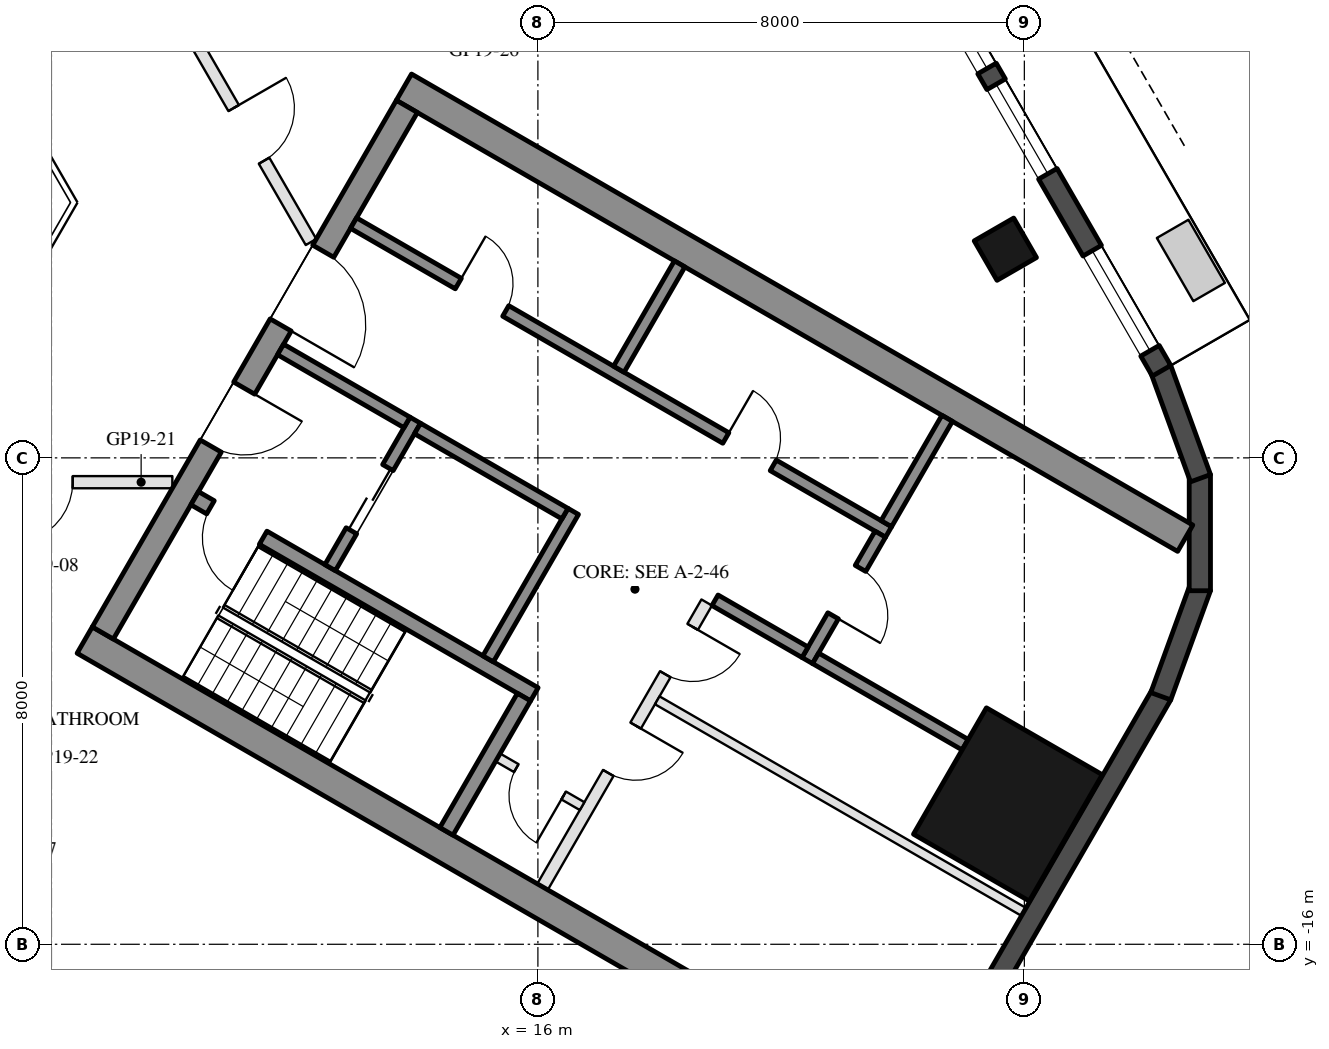
"""IFC4 building model, lengths in metres.
Left out: names, types, materials, properties, quantities, classifications, styles, units other than length and angle.
Written with IfcOpenShell. Run it as: python <this file> out.ifc"""

import sys

from ifc_helpers import new_model, si_unit, direction, frame, frame_2d, origin, origin_2d, place, context, subcontext, project, spatial, rectangle, hollow_rectangle, extrude, element, fill, save


model = new_model("IFC4")
c1 = context("Model", 3, precision=1e-05, world=origin(), true_north=direction((0.0, 1.0)))
c2 = subcontext(c1, "Body", "Model", "MODEL_VIEW")
j1 = project(units=[si_unit("LENGTHUNIT", "METRE"), si_unit("PLANEANGLEUNIT", "RADIAN")], contexts=[c1])
p1 = place(None, origin())
s1 = spatial("IfcSite", under=j1, at=p1, CompositionType="ELEMENT")
p2 = place(p1, origin())
s2 = spatial("IfcBuilding", under=s1, at=p2, CompositionType="ELEMENT")
p3 = place(p2, frame((0.0, 0.0, 202.1)))
s3 = spatial("IfcBuildingStorey", under=s2, at=p3, CompositionType="ELEMENT", Elevation=202.1)
p4 = place(p3, frame((23.688, -4.568, 0.0), z_axis=(0.0, 0.0, 1.0), x_axis=(-0.5, 0.866025403784, 0.0)))
e1 = element("IfcColumn", 1, at=p4, inside=s3, PredefinedType="COLUMN", context=c2, shape_type="SweptSolid", body=[
    extrude(hollow_rectangle(XDim=0.75, YDim=0.75, WallThickness=0.035, at=origin_2d()), origin(), (0.0, 0.0, 1.0), 3.7),
])
p5 = place(p3, frame((23.729, -13.7, 0.0), z_axis=(0.0, 0.0, 1.0), x_axis=(0.5, 0.866025403784, 0.0)))
e2 = element("IfcColumn", 2, at=p5, inside=s3, PredefinedType="COLUMN", context=c2, shape_type="SweptSolid", body=[
    extrude(hollow_rectangle(XDim=2.4, YDim=2.2, WallThickness=0.06, at=origin_2d()), origin(), (0.0, 0.0, 1.0), 3.7),
])
p6 = place(p3, frame((23.427, -16.792, 0.0), z_axis=(0.0, 0.0, 1.0), x_axis=(0.500018773155, 0.866014564827, 0.0)))
e3 = element("IfcWall", 3, at=p6, inside=s3, PredefinedType="SOLIDWALL", context=c2, shape_type="SweptSolid", body=[
    extrude(rectangle(XDim=5.658, YDim=0.35, at=frame_2d((2.829, 0.0))), origin(), (0.0, 0.0, 1.0), 3.55),
])
for number, where, z_axis, x_axis in (
    (4, (26.244, -11.92, 0.0), (0.0, 0.0, 1.0), (0.342, 0.94, 0.0)),
    (5, (26.886, -10.185, 0.0), (0.0, 0.0, 1.0), (0.0, 1.0, 0.0)),
    (6, (26.897, -8.335, 0.0), (0.0, 0.0, 1.0), (-0.342, 0.94, 0.0)),
):
    element("IfcWall", number, at=place(p3, frame(where, z_axis=z_axis, x_axis=x_axis)), inside=s3, PredefinedType="SOLIDWALL", context=c2, shape_type="SweptSolid", body=[
        extrude(rectangle(XDim=1.91, YDim=0.35, at=frame_2d((0.955, 0.0))), origin(), (0.0, 0.0, 1.0), 3.55),
    ])
p7 = place(p3, frame((26.257, -6.567, 0.0), z_axis=(0.0, 0.0, 1.0), x_axis=(-0.500023526245, 0.866011820475, 0.0)))
e7 = element("IfcWall", 7, at=p7, inside=s3, PredefinedType="SOLIDWALL", context=c2, shape_type="SweptSolid", body=[
    extrude(rectangle(XDim=11.816, YDim=0.35, at=frame_2d((5.908, 0.0))), origin(), (0.0, 0.0, 1.0), 3.55),
])
p8 = place(p7, frame((0.38, 0.0, 0.3)))
e8 = element("IfcOpeningElement", 8, at=p8, cuts=e7, PredefinedType="OPENING", context=c2, shape_type="SweptSolid", body=[
    extrude(rectangle(XDim=1.9, YDim=2.65, at=frame_2d((0.95, 1.325))), frame((0.0, 0.185, 0.0), z_axis=(0.0, -1.0, 0.0), x_axis=(1.0, 0.0, 0.0)), (0.0, 0.0, 1.0), 0.37),
])
p9 = place(p7, frame((7.791, 0.0, 0.0)))
e9 = element("IfcOpeningElement", 9, at=p9, cuts=e7, PredefinedType="OPENING", context=c2, shape_type="SweptSolid", body=[
    extrude(rectangle(XDim=2.4, YDim=2.4, at=frame_2d((1.2, 1.2))), frame((0.0, 0.185, 0.0), z_axis=(0.0, -1.0, 0.0), x_axis=(1.0, 0.0, 0.0)), (0.0, 0.0, 1.0), 0.37),
])
p10 = place(p7, frame((3.741, 0.0, 0.3)))
e10 = element("IfcOpeningElement", 10, at=p10, cuts=e7, PredefinedType="OPENING", context=c2, shape_type="SweptSolid", body=[
    extrude(rectangle(XDim=1.7, YDim=2.65, at=frame_2d((0.85, 1.325))), frame((0.0, 0.185, 0.0), z_axis=(0.0, -1.0, 0.0), x_axis=(1.0, 0.0, 0.0)), (0.0, 0.0, 1.0), 0.37),
])
p11 = place(p7, frame((5.741, 0.0, 0.3)))
e11 = element("IfcOpeningElement", 11, at=p11, cuts=e7, PredefinedType="OPENING", context=c2, shape_type="SweptSolid", body=[
    extrude(rectangle(XDim=1.7, YDim=2.65, at=frame_2d((0.85, 1.325))), frame((0.0, 0.185, 0.0), z_axis=(0.0, -1.0, 0.0), x_axis=(1.0, 0.0, 0.0)), (0.0, 0.0, 1.0), 0.37),
])
for number, where, z_axis, x_axis in (
    (12, (8.547, -10.997, 0.0), (0.0, 0.0, 1.0), (0.866, -0.5, 0.0)),
    (13, (13.797, -1.903, 0.0), (0.0, 0.0, 1.0), (0.866, -0.5, 0.0)),
):
    element("IfcWall", number, at=place(p3, frame(where, z_axis=z_axis, x_axis=x_axis)), inside=s3, PredefinedType="SHEAR", context=c2, shape_type="SweptSolid", body=[
        extrude(rectangle(XDim=14.837, YDim=0.5, at=frame_2d((7.418, 0.0))), origin(), (0.0, 0.0, 1.0), 3.5),
    ])
p12 = place(p3, frame((8.845, -10.88, 0.0), z_axis=(0.0, 0.0, 1.0), x_axis=(0.500004234368, 0.866022959057, 0.0)))
e14 = element("IfcWall", 14, at=p12, inside=s3, PredefinedType="SHEAR", context=c2, shape_type="SweptSolid", body=[
    extrude(rectangle(XDim=10.0, YDim=0.4, at=frame_2d((5.0, 0.0))), origin(), (0.0, 0.0, 1.0), 3.5),
])
p13 = place(p12, frame((3.55, 0.0, 0.0)))
e15 = element("IfcOpeningElement", 15, at=p13, cuts=e14, PredefinedType="OPENING", context=c2, shape_type="SweptSolid", body=[
    extrude(rectangle(XDim=1.1, YDim=2.1, at=frame_2d((0.55, 1.05))), frame((0.0, 0.21, 0.0), z_axis=(0.0, -1.0, 0.0), x_axis=(1.0, 0.0, 0.0)), (0.0, 0.0, 1.0), 0.42),
])
p14 = place(p12, frame((5.85, 0.0, 0.0)))
e16 = element("IfcOpeningElement", 16, at=p14, cuts=e14, PredefinedType="OPENING", context=c2, shape_type="SweptSolid", body=[
    extrude(rectangle(XDim=1.4, YDim=2.1, at=frame_2d((0.7, 1.05))), frame((0.0, 0.21, 0.0), z_axis=(0.0, -1.0, 0.0), x_axis=(1.0, 0.0, 0.0)), (0.0, 0.0, 1.0), 0.42),
])
p15 = place(p3, frame((10.356, -8.664, 0.0), z_axis=(0.0, 0.0, 1.0), x_axis=(0.866028629588, -0.499994412703, 0.0)))
e17 = element("IfcWall", 17, at=p15, inside=s3, PredefinedType="SHEAR", context=c2, shape_type="SweptSolid", body=[
    extrude(rectangle(XDim=6.45, YDim=0.25, at=frame_2d((3.225, 0.0))), origin(), (0.0, 0.0, 1.0), 3.5),
])
p16 = place(p15, frame((0.3, 0.0, 0.0)))
e18 = element("IfcOpeningElement", 18, at=p16, cuts=e17, PredefinedType="OPENING", context=c2, shape_type="SweptSolid", body=[
    extrude(rectangle(XDim=1.0, YDim=2.1, at=frame_2d((0.5, 1.05))), frame((0.0, 0.135, 0.0), z_axis=(0.0, -1.0, 0.0), x_axis=(1.0, 0.0, 0.0)), (0.0, 0.0, 1.0), 0.27),
])
p17 = place(p3, frame((14.496, -14.143, 0.0), z_axis=(0.0, 0.0, 1.0), x_axis=(0.500062241894, 0.865989465428, 0.0)))
e19 = element("IfcWall", 19, at=p17, inside=s3, PredefinedType="SHEAR", context=c2, shape_type="SweptSolid", body=[
    extrude(rectangle(XDim=2.55, YDim=0.25, at=frame_2d((1.275, 0.0))), origin(), (0.0, 0.0, 1.0), 3.5),
])
p18 = place(p3, frame((15.181, -11.305, 0.0), z_axis=(0.0, 0.0, 1.0), x_axis=(0.49994636267, 0.866056369097, 0.0)))
e20 = element("IfcWall", 20, at=p18, inside=s3, PredefinedType="SHEAR", context=c2, shape_type="SweptSolid", body=[
    extrude(rectangle(XDim=2.8, YDim=0.2, at=frame_2d((1.4, 0.0))), origin(), (0.0, 0.0, 1.0), 3.5),
])
p19 = place(p3, frame((12.583, -9.805, 0.0), z_axis=(0.0, 0.0, 1.0), x_axis=(0.49994636267, 0.866056369097, 0.0)))
e21 = element("IfcWall", 21, at=p19, inside=s3, PredefinedType="SHEAR", context=c2, shape_type="SweptSolid", body=[
    extrude(rectangle(XDim=2.8, YDim=0.2, at=frame_2d((1.4, 0.0))), origin(), (0.0, 0.0, 1.0), 3.5),
])
p20 = place(p19, frame((0.7, 0.0, 0.0)))
e22 = element("IfcOpeningElement", 22, at=p20, cuts=e21, PredefinedType="OPENING", context=c2, shape_type="SweptSolid", body=[
    extrude(rectangle(XDim=1.2, YDim=2.1, at=frame_2d((0.6, 1.05))), frame((0.0, 0.11, 0.0), z_axis=(0.0, -1.0, 0.0), x_axis=(1.0, 0.0, 0.0)), (0.0, 0.0, 1.0), 0.22),
])
p21 = place(p3, frame((11.768, -6.217, 0.0), z_axis=(0.0, 0.0, 1.0), x_axis=(0.866050077142, -0.499957262057, 0.0)))
e23 = element("IfcWall", 23, at=p21, inside=s3, PredefinedType="SHEAR", context=c2, shape_type="SweptSolid", body=[
    extrude(rectangle(XDim=2.4, YDim=0.2, at=frame_2d((1.2, 0.0))), origin(), (0.0, 0.0, 1.0), 3.5),
])
p22 = place(p3, frame((14.02, -7.517, 0.0), z_axis=(0.0, 0.0, 1.0), x_axis=(0.866034573852, -0.49998411664, 0.0)))
e24 = element("IfcWall", 24, at=p22, inside=s3, PredefinedType="SHEAR", context=c2, shape_type="SweptSolid", body=[
    extrude(rectangle(XDim=2.8, YDim=0.2, at=frame_2d((1.4, 0.0))), origin(), (0.0, 0.0, 1.0), 3.5),
])
p23 = place(p3, frame((12.968, -4.138, 0.0), z_axis=(0.0, 0.0, 1.0), x_axis=(0.866028328073, -0.49999493495, 0.0)))
e25 = element("IfcWall", 25, at=p23, inside=s3, PredefinedType="SHEAR", context=c2, shape_type="SweptSolid", body=[
    extrude(rectangle(XDim=10.16, YDim=0.2, at=frame_2d((5.08, 0.0))), origin(), (0.0, 0.0, 1.0), 3.5),
])
p24 = place(p23, frame((1.99, 0.0, 0.0)))
e26 = element("IfcOpeningElement", 26, at=p24, cuts=e25, PredefinedType="OPENING", context=c2, shape_type="SweptSolid", body=[
    extrude(rectangle(XDim=0.9, YDim=2.1, at=frame_2d((0.45, 1.05))), frame((0.0, 0.11, 0.0), z_axis=(0.0, -1.0, 0.0), x_axis=(1.0, 0.0, 0.0)), (0.0, 0.0, 1.0), 0.22),
])
p25 = place(p23, frame((7.07, 0.0, 0.0)))
e27 = element("IfcOpeningElement", 27, at=p25, cuts=e25, PredefinedType="OPENING", context=c2, shape_type="SweptSolid", body=[
    extrude(rectangle(XDim=0.9, YDim=2.1, at=frame_2d((0.45, 1.05))), frame((0.0, 0.11, 0.0), z_axis=(0.0, -1.0, 0.0), x_axis=(1.0, 0.0, 0.0)), (0.0, 0.0, 1.0), 0.22),
])
p26 = place(p3, frame((20.43, -11.333, 0.0), z_axis=(0.0, 0.0, 1.0), x_axis=(0.500001309137, 0.866024647952, 0.0)))
e28 = element("IfcWall", 28, at=p26, inside=s3, PredefinedType="SHEAR", context=c2, shape_type="SweptSolid", body=[
    extrude(rectangle(XDim=2.4, YDim=0.2, at=frame_2d((1.2, 0.0))), origin(), (0.0, 0.0, 1.0), 3.5),
])
p27 = place(p26, frame((0.85, 0.0, 0.0)))
e29 = element("IfcOpeningElement", 29, at=p27, cuts=e28, PredefinedType="OPENING", context=c2, shape_type="SweptSolid", body=[
    extrude(rectangle(XDim=0.9, YDim=2.1, at=frame_2d((0.45, 1.05))), frame((0.0, 0.11, 0.0), z_axis=(0.0, -1.0, 0.0), x_axis=(1.0, 0.0, 0.0)), (0.0, 0.0, 1.0), 0.22),
])
p28 = place(p3, frame((18.913, -10.342, 0.0), z_axis=(0.0, 0.0, 1.0), x_axis=(0.866038183914, -0.499977863513, 0.0)))
e30 = element("IfcWall", 30, at=p28, inside=s3, PredefinedType="SHEAR", context=c2, shape_type="SweptSolid", body=[
    extrude(rectangle(XDim=1.71, YDim=0.2, at=frame_2d((0.855, 0.0))), origin(), (0.0, 0.0, 1.0), 3.5),
])
for number, where, z_axis, x_axis in (
    (31, (17.331, -6.542, 0.0), (0.0, 0.0, 1.0), (0.5, 0.866, 0.0)),
    (32, (21.73, -9.082, 0.0), (0.0, 0.0, 1.0), (0.5, 0.866, 0.0)),
):
    element("IfcWall", number, at=place(p3, frame(where, z_axis=z_axis, x_axis=x_axis)), inside=s3, PredefinedType="SHEAR", context=c2, shape_type="SweptSolid", body=[
        extrude(rectangle(XDim=2.0, YDim=0.2, at=frame_2d((1.0, 0.0))), origin(), (0.0, 0.0, 1.0), 3.5),
    ])
p29 = place(p3, frame((20.567, -11.297, 0.0), z_axis=(0.0, 0.0, 1.0), x_axis=(0.866055327414, -0.49994816717, 0.0)))
e33 = element("IfcWall", 33, at=p29, inside=s3, PredefinedType="SHEAR", context=c2, shape_type="SweptSolid", body=[
    extrude(rectangle(XDim=2.84, YDim=0.2, at=frame_2d((1.42, 0.0))), origin(), (0.0, 0.0, 1.0), 3.5),
])
p30 = place(p3, frame((16.076, -15.055, 0.0), z_axis=(0.0, 0.0, 1.0), x_axis=(0.499995103361, 0.866028230842, 0.0)))
e34 = element("IfcWall", 34, at=p30, inside=s3, PredefinedType="PARTITIONING", context=c2, shape_type="SweptSolid", body=[
    extrude(rectangle(XDim=5.4, YDim=0.2, at=frame_2d((2.7, 0.0))), origin(), (0.0, 0.0, 1.0), 3.5),
])
p31 = place(p30, frame((2.163, 0.0, 0.0)))
e35 = element("IfcOpeningElement", 35, at=p31, cuts=e34, PredefinedType="OPENING", context=c2, shape_type="SweptSolid", body=[
    extrude(rectangle(XDim=0.9, YDim=2.1, at=frame_2d((0.45, 1.05))), frame((0.0, 0.11, 0.0), z_axis=(0.0, -1.0, 0.0), x_axis=(1.0, 0.0, 0.0)), (0.0, 0.0, 1.0), 0.22),
])
p32 = place(p30, frame((4.038, 0.0, 0.0)))
e36 = element("IfcOpeningElement", 36, at=p32, cuts=e34, PredefinedType="OPENING", context=c2, shape_type="SweptSolid", body=[
    extrude(rectangle(XDim=0.9, YDim=2.1, at=frame_2d((0.45, 1.05))), frame((0.0, 0.11, 0.0), z_axis=(0.0, -1.0, 0.0), x_axis=(1.0, 0.0, 0.0)), (0.0, 0.0, 1.0), 0.22),
])
p33 = place(p3, frame((15.342, -12.928, 0.0), z_axis=(0.0, 0.0, 1.0), x_axis=(0.865989903783, -0.500061482766, 0.0)))
e37 = element("IfcWall", 37, at=p33, inside=s3, PredefinedType="PARTITIONING", context=c2, shape_type="SweptSolid", body=[
    extrude(rectangle(XDim=1.6, YDim=0.15, at=frame_2d((0.8, 0.0))), origin(), (0.0, 0.0, 1.0), 3.5),
])
p34 = place(p33, frame((0.35, 0.0, 0.0)))
e38 = element("IfcOpeningElement", 38, at=p34, cuts=e37, PredefinedType="OPENING", context=c2, shape_type="SweptSolid", body=[
    extrude(rectangle(XDim=0.9, YDim=2.1, at=frame_2d((0.45, 1.05))), frame((0.0, 0.085, 0.0), z_axis=(0.0, -1.0, 0.0), x_axis=(1.0, 0.0, 0.0)), (0.0, 0.0, 1.0), 0.17),
])
p35 = place(p3, frame((17.963, -11.987, 0.0), z_axis=(0.0, 0.0, 1.0), x_axis=(0.866016523273, -0.500015381182, 0.0)))
e39 = element("IfcWall", 39, at=p35, inside=s3, PredefinedType="PARTITIONING", context=c2, shape_type="SweptSolid", body=[
    extrude(rectangle(XDim=6.95, YDim=0.15, at=frame_2d((3.475, 0.0))), origin(), (0.0, 0.0, 1.0), 3.5),
])
p36 = place(p3, frame((9.988, -8.4, 0.0), z_axis=(0.0, 0.0, 1.0), x_axis=(-1.0, 0.0, 0.0)))
e40 = element("IfcWall", 40, at=p36, inside=s3, PredefinedType="PARTITIONING", context=c2, shape_type="SweptSolid", body=[
    extrude(rectangle(XDim=4.277, YDim=0.2, at=frame_2d((2.139, 0.0))), origin(), (0.0, 0.0, 1.0), 2.95),
])
p37 = place(p36, frame((1.639, 0.0, 0.0)))
e41 = element("IfcOpeningElement", 41, at=p37, cuts=e40, PredefinedType="OPENING", context=c2, shape_type="SweptSolid", body=[
    extrude(rectangle(XDim=1.0, YDim=2.1, at=frame_2d((0.5, 1.05))), frame((0.0, 0.11, 0.0), z_axis=(0.0, -1.0, 0.0), x_axis=(1.0, 0.0, 0.0)), (0.0, 0.0, 1.0), 0.22),
])
p38 = place(p3, frame((10.225, -0.909, 0.0), z_axis=(0.0, 0.0, 1.0), x_axis=(0.500011931275, -0.86601851515, 0.0)))
e42 = element("IfcWall", 42, at=p38, inside=s3, PredefinedType="PARTITIONING", context=c2, shape_type="SweptSolid", body=[
    extrude(rectangle(XDim=4.088, YDim=0.2, at=frame_2d((2.044, 0.0))), origin(), (0.0, 0.0, 1.0), 2.95),
])
p39 = place(p38, frame((1.544, 0.0, 0.0)))
e43 = element("IfcOpeningElement", 43, at=p39, cuts=e42, PredefinedType="OPENING", context=c2, shape_type="SweptSolid", body=[
    extrude(rectangle(XDim=1.0, YDim=2.1, at=frame_2d((0.5, 1.05))), frame((0.0, 0.11, 0.0), z_axis=(0.0, -1.0, 0.0), x_axis=(1.0, 0.0, 0.0)), (0.0, 0.0, 1.0), 0.22),
])
p40 = place(p8, origin())
e44 = element("IfcWindow", 44, at=p40, inside=s3, PartitioningType="SINGLE_PANEL", PredefinedType="WINDOW", context=c2, shape_type="SweptSolid", body=[
    extrude(rectangle(XDim=1.9, YDim=2.65, at=frame_2d((0.95, 1.325))), frame((0.0, 0.03, 0.0), z_axis=(0.0, -1.0, 0.0), x_axis=(1.0, 0.0, 0.0)), (0.0, 0.0, 1.0), 0.06),
])
fill(e8, e44)
p41 = place(p10, origin())
e45 = element("IfcWindow", 45, at=p41, inside=s3, PartitioningType="SINGLE_PANEL", PredefinedType="WINDOW", context=c2, shape_type="SweptSolid", body=[
    extrude(rectangle(XDim=1.7, YDim=2.65, at=frame_2d((0.85, 1.325))), frame((0.0, 0.03, 0.0), z_axis=(0.0, -1.0, 0.0), x_axis=(1.0, 0.0, 0.0)), (0.0, 0.0, 1.0), 0.06),
])
fill(e10, e45)
p42 = place(p11, origin())
e46 = element("IfcWindow", 46, at=p42, inside=s3, PartitioningType="SINGLE_PANEL", PredefinedType="WINDOW", context=c2, shape_type="SweptSolid", body=[
    extrude(rectangle(XDim=1.7, YDim=2.65, at=frame_2d((0.85, 1.325))), frame((0.0, 0.03, 0.0), z_axis=(0.0, -1.0, 0.0), x_axis=(1.0, 0.0, 0.0)), (0.0, 0.0, 1.0), 0.06),
])
fill(e11, e46)
p43 = place(p20, origin())
e47 = element("IfcDoor", 47, at=p43, inside=s3, OperationType="DOUBLE_DOOR_SLIDING", PredefinedType="DOOR", context=c2, shape_type="SweptSolid", body=[
    extrude(rectangle(XDim=1.2, YDim=2.1, at=frame_2d((0.6, 1.05))), frame((0.0, 0.025, 0.0), z_axis=(0.0, -1.0, 0.0), x_axis=(1.0, 0.0, 0.0)), (0.0, 0.0, 1.0), 0.05),
])
fill(e22, e47)
p44 = place(p34, frame((0.9, 0.0, 0.0), z_axis=(0.0, 0.0, 1.0), x_axis=(-1.0, 0.0, 0.0)))
e48 = element("IfcDoor", 48, at=p44, inside=s3, OperationType="SINGLE_SWING_LEFT", PredefinedType="DOOR", context=c2, shape_type="SweptSolid", body=[
    extrude(rectangle(XDim=0.9, YDim=2.1, at=frame_2d((0.45, 1.05))), frame((0.0, 0.025, 0.0), z_axis=(0.0, -1.0, 0.0), x_axis=(1.0, 0.0, 0.0)), (0.0, 0.0, 1.0), 0.05),
])
fill(e38, e48)
p45 = place(p24, origin())
e49 = element("IfcDoor", 49, at=p45, inside=s3, OperationType="SINGLE_SWING_LEFT", PredefinedType="DOOR", context=c2, shape_type="SweptSolid", body=[
    extrude(rectangle(XDim=0.9, YDim=2.1, at=frame_2d((0.45, 1.05))), frame((0.0, 0.025, 0.0), z_axis=(0.0, -1.0, 0.0), x_axis=(1.0, 0.0, 0.0)), (0.0, 0.0, 1.0), 0.05),
])
fill(e26, e49)
p46 = place(p25, origin())
e50 = element("IfcDoor", 50, at=p46, inside=s3, OperationType="SINGLE_SWING_LEFT", PredefinedType="DOOR", context=c2, shape_type="SweptSolid", body=[
    extrude(rectangle(XDim=0.9, YDim=2.1, at=frame_2d((0.45, 1.05))), frame((0.0, 0.025, 0.0), z_axis=(0.0, -1.0, 0.0), x_axis=(1.0, 0.0, 0.0)), (0.0, 0.0, 1.0), 0.05),
])
fill(e27, e50)
p47 = place(p27, frame((0.9, 0.0, 0.0), z_axis=(0.0, 0.0, 1.0), x_axis=(-1.0, 0.0, 0.0)))
e51 = element("IfcDoor", 51, at=p47, inside=s3, OperationType="SINGLE_SWING_RIGHT", PredefinedType="DOOR", context=c2, shape_type="SweptSolid", body=[
    extrude(rectangle(XDim=0.9, YDim=2.1, at=frame_2d((0.45, 1.05))), frame((0.0, 0.025, 0.0), z_axis=(0.0, -1.0, 0.0), x_axis=(1.0, 0.0, 0.0)), (0.0, 0.0, 1.0), 0.05),
])
fill(e29, e51)
p48 = place(p31, frame((0.9, 0.0, 0.0), z_axis=(0.0, 0.0, 1.0), x_axis=(-1.0, 0.0, 0.0)))
e52 = element("IfcDoor", 52, at=p48, inside=s3, OperationType="SINGLE_SWING_LEFT", PredefinedType="DOOR", context=c2, shape_type="SweptSolid", body=[
    extrude(rectangle(XDim=0.9, YDim=2.1, at=frame_2d((0.45, 1.05))), frame((0.0, 0.025, 0.0), z_axis=(0.0, -1.0, 0.0), x_axis=(1.0, 0.0, 0.0)), (0.0, 0.0, 1.0), 0.05),
])
fill(e35, e52)
p49 = place(p32, frame((0.9, 0.0, 0.0), z_axis=(0.0, 0.0, 1.0), x_axis=(-1.0, 0.0, 0.0)))
e53 = element("IfcDoor", 53, at=p49, inside=s3, OperationType="SINGLE_SWING_LEFT", PredefinedType="DOOR", context=c2, shape_type="SweptSolid", body=[
    extrude(rectangle(XDim=0.9, YDim=2.1, at=frame_2d((0.45, 1.05))), frame((0.0, 0.025, 0.0), z_axis=(0.0, -1.0, 0.0), x_axis=(1.0, 0.0, 0.0)), (0.0, 0.0, 1.0), 0.05),
])
fill(e36, e53)
p50 = place(p13, frame((1.1, 0.0, 0.0), z_axis=(0.0, 0.0, 1.0), x_axis=(-1.0, 0.0, 0.0)))
e54 = element("IfcDoor", 54, at=p50, inside=s3, OperationType="SINGLE_SWING_LEFT", PredefinedType="DOOR", context=c2, shape_type="SweptSolid", body=[
    extrude(rectangle(XDim=1.1, YDim=2.1, at=frame_2d((0.55, 1.05))), frame((0.0, 0.025, 0.0), z_axis=(0.0, -1.0, 0.0), x_axis=(1.0, 0.0, 0.0)), (0.0, 0.0, 1.0), 0.05),
])
fill(e15, e54)
p51 = place(p14, frame((1.4, 0.0, 0.0), z_axis=(0.0, 0.0, 1.0), x_axis=(-1.0, 0.0, 0.0)))
e55 = element("IfcDoor", 55, at=p51, inside=s3, OperationType="DOUBLE_DOOR_SINGLE_SWING", PredefinedType="DOOR", context=c2, shape_type="SweptSolid", body=[
    extrude(rectangle(XDim=1.4, YDim=2.1, at=frame_2d((0.7, 1.05))), frame((0.0, 0.025, 0.0), z_axis=(0.0, -1.0, 0.0), x_axis=(1.0, 0.0, 0.0)), (0.0, 0.0, 1.0), 0.05),
])
fill(e16, e55)
p52 = place(p16, frame((1.0, 0.0, 0.0), z_axis=(0.0, 0.0, 1.0), x_axis=(-1.0, 0.0, 0.0)))
e56 = element("IfcDoor", 56, at=p52, inside=s3, OperationType="SINGLE_SWING_LEFT", PredefinedType="DOOR", context=c2, shape_type="SweptSolid", body=[
    extrude(rectangle(XDim=1.0, YDim=2.1, at=frame_2d((0.5, 1.05))), frame((0.0, 0.025, 0.0), z_axis=(0.0, -1.0, 0.0), x_axis=(1.0, 0.0, 0.0)), (0.0, 0.0, 1.0), 0.05),
])
fill(e18, e56)
p53 = place(p37, origin())
e57 = element("IfcDoor", 57, at=p53, inside=s3, OperationType="SINGLE_SWING_RIGHT", PredefinedType="DOOR", context=c2, shape_type="SweptSolid", body=[
    extrude(rectangle(XDim=1.0, YDim=2.1, at=frame_2d((0.5, 1.05))), frame((0.0, 0.025, 0.0), z_axis=(0.0, -1.0, 0.0), x_axis=(1.0, 0.0, 0.0)), (0.0, 0.0, 1.0), 0.05),
])
fill(e41, e57)
p54 = place(p39, origin())
e58 = element("IfcDoor", 58, at=p54, inside=s3, OperationType="SINGLE_SWING_LEFT", PredefinedType="DOOR", context=c2, shape_type="SweptSolid", body=[
    extrude(rectangle(XDim=1.0, YDim=2.1, at=frame_2d((0.5, 1.05))), frame((0.0, 0.025, 0.0), z_axis=(0.0, -1.0, 0.0), x_axis=(1.0, 0.0, 0.0)), (0.0, 0.0, 1.0), 0.05),
])
fill(e43, e58)
save(model, sys.argv[1])
